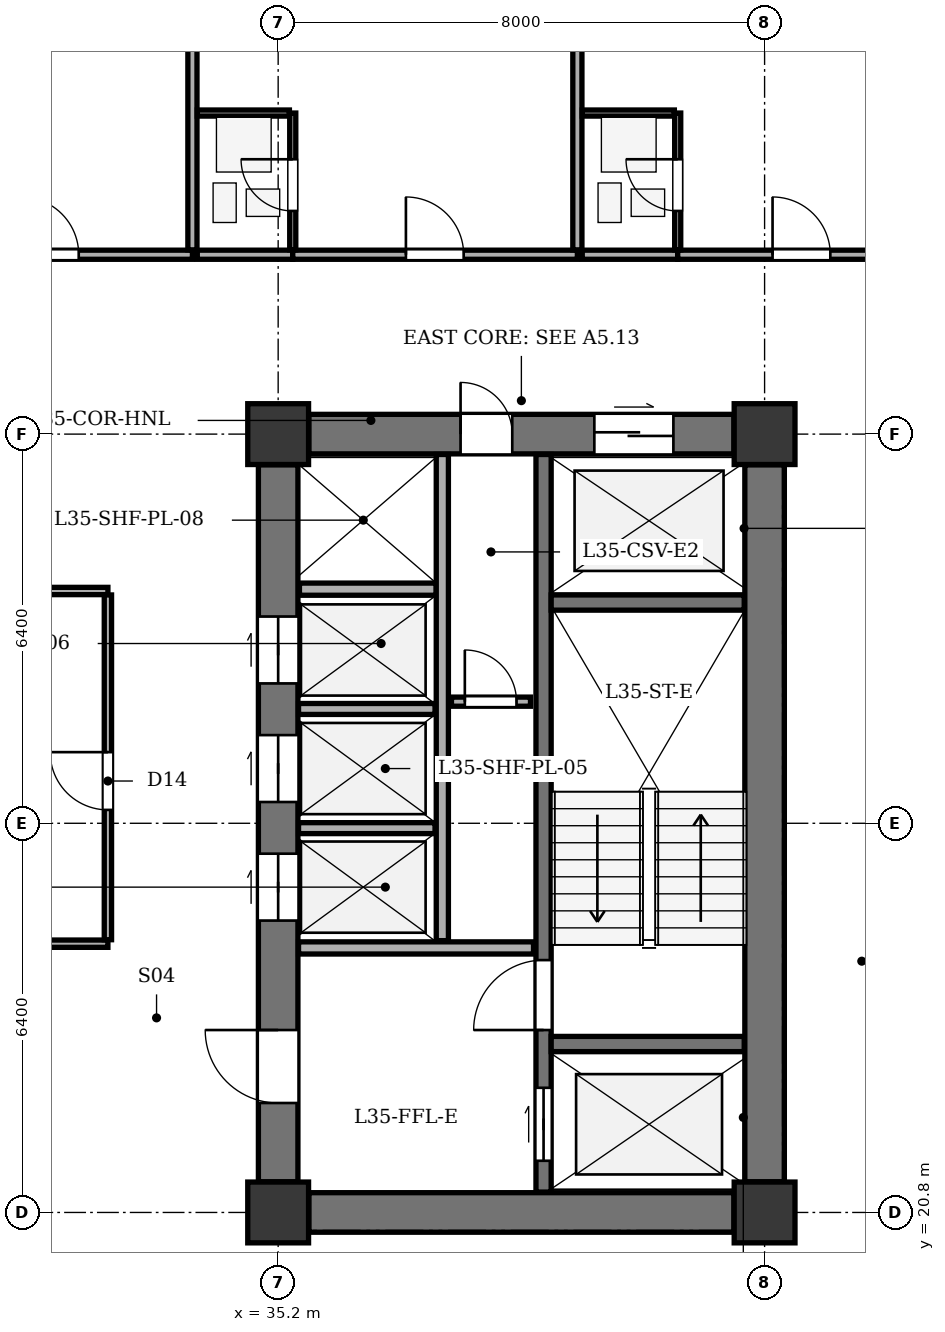
"""IFC4 building model, lengths in metres.
Left out: names, types, materials, properties, quantities, classifications, styles, units other than length and angle.
Written with IfcOpenShell. Run it as: python <this file> out.ifc"""

import sys

from ifc_helpers import new_model, si_unit, direction, frame, frame_2d, origin, origin_2d, place, context, subcontext, project, spatial, rectangle, extrude, element, fill, save


model = new_model("IFC4")
c1 = context("Model", 3, precision=1e-05, world=origin(), true_north=direction((0.0, 1.0)))
c2 = subcontext(c1, "Body", "Model", "MODEL_VIEW")
j1 = project(units=[si_unit("LENGTHUNIT", "METRE"), si_unit("PLANEANGLEUNIT", "RADIAN")], contexts=[c1])
p1 = place(None, origin())
s1 = spatial("IfcSite", under=j1, at=p1, CompositionType="ELEMENT")
p2 = place(p1, origin())
s2 = spatial("IfcBuilding", under=s1, at=p2, CompositionType="ELEMENT")
p3 = place(p2, frame((0.0, 0.0, 141.3)))
s3 = spatial("IfcBuildingStorey", under=s2, at=p3, CompositionType="ELEMENT", Elevation=141.3)
for number, where, z_axis, x_axis in (
    (1, (35.2, 20.8, 0.0), (0.0, 0.0, 1.0), (1.0, 0.0, 0.0)),
    (2, (43.2, 20.8, 0.0), (0.0, 0.0, 1.0), (1.0, 0.0, 0.0)),
    (3, (35.2, 33.6, 0.0), (0.0, 0.0, 1.0), (1.0, 0.0, 0.0)),
    (4, (43.2, 33.6, 0.0), (0.0, 0.0, 1.0), (1.0, 0.0, 0.0)),
):
    element("IfcColumn", number, at=place(p3, frame(where, z_axis=z_axis, x_axis=x_axis)), inside=s3, PredefinedType="COLUMN", context=c2, shape_type="SweptSolid", body=[
        extrude(rectangle(XDim=1.0, YDim=1.0, at=origin_2d()), origin(), (0.0, 0.0, 1.0), 3.5),
    ])
p4 = place(p3, frame((43.2, 21.305, 0.0), z_axis=(0.0, 0.0, 1.0), x_axis=(0.0, 1.0, 0.0)))
e5 = element("IfcWall", 5, at=p4, inside=s3, PredefinedType="SHEAR", context=c2, shape_type="SweptSolid", body=[
    extrude(rectangle(XDim=11.79, YDim=0.65, at=frame_2d((5.895, 0.0))), origin(), (0.0, 0.0, 1.0), 3.2),
])
p5 = place(p3, frame((35.705, 20.8, 0.0), z_axis=(0.0, 0.0, 1.0), x_axis=(1.0, 0.0, 0.0)))
e6 = element("IfcWall", 6, at=p5, inside=s3, PredefinedType="SHEAR", context=c2, shape_type="SweptSolid", body=[
    extrude(rectangle(XDim=6.99, YDim=0.65, at=frame_2d((3.495, 0.0))), origin(), (0.0, 0.0, 1.0), 3.2),
])
p6 = place(p3, frame((35.705, 33.6, 0.0), z_axis=(0.0, 0.0, 1.0), x_axis=(1.0, 0.0, 0.0)))
e7 = element("IfcWall", 7, at=p6, inside=s3, PredefinedType="SHEAR", context=c2, shape_type="SweptSolid", body=[
    extrude(rectangle(XDim=6.99, YDim=0.65, at=frame_2d((3.495, 0.0))), origin(), (0.0, 0.0, 1.0), 3.2),
])
p7 = place(p6, frame((4.695, 0.0, 0.0)))
e8 = element("IfcOpeningElement", 8, at=p7, cuts=e7, PredefinedType="OPENING", context=c2, shape_type="SweptSolid", body=[
    extrude(rectangle(XDim=1.3, YDim=2.15, at=frame_2d((0.65, 1.075))), frame((0.0, 0.335, 0.0), z_axis=(0.0, -1.0, 0.0), x_axis=(1.0, 0.0, 0.0)), (0.0, 0.0, 1.0), 0.67),
])
p8 = place(p6, frame((2.495, 0.0, 0.0)))
e9 = element("IfcOpeningElement", 9, at=p8, cuts=e7, PredefinedType="OPENING", context=c2, shape_type="SweptSolid", body=[
    extrude(rectangle(XDim=0.85, YDim=2.02, at=frame_2d((0.425, 1.01))), frame((0.0, 0.335, 0.0), z_axis=(0.0, -1.0, 0.0), x_axis=(1.0, 0.0, 0.0)), (0.0, 0.0, 1.0), 0.67),
])
p9 = place(p3, frame((35.2, 21.305, 0.0), z_axis=(0.0, 0.0, 1.0), x_axis=(0.0, 1.0, 0.0)))
e10 = element("IfcWall", 10, at=p9, inside=s3, PredefinedType="SHEAR", context=c2, shape_type="SweptSolid", body=[
    extrude(rectangle(XDim=11.79, YDim=0.65, at=frame_2d((5.895, 0.0))), origin(), (0.0, 0.0, 1.0), 3.2),
])
p10 = place(p9, frame((1.295, 0.0, 0.0)))
e11 = element("IfcOpeningElement", 11, at=p10, cuts=e10, PredefinedType="OPENING", context=c2, shape_type="SweptSolid", body=[
    extrude(rectangle(XDim=1.2, YDim=2.15, at=frame_2d((0.6, 1.075))), frame((0.0, 0.335, 0.0), z_axis=(0.0, -1.0, 0.0), x_axis=(1.0, 0.0, 0.0)), (0.0, 0.0, 1.0), 0.67),
])
p11 = place(p9, frame((4.295, 0.0, 0.0)))
e12 = element("IfcOpeningElement", 12, at=p11, cuts=e10, PredefinedType="OPENING", context=c2, shape_type="SweptSolid", body=[
    extrude(rectangle(XDim=1.1, YDim=2.1, at=frame_2d((0.55, 1.05))), frame((0.0, 0.335, 0.0), z_axis=(0.0, -1.0, 0.0), x_axis=(1.0, 0.0, 0.0)), (0.0, 0.0, 1.0), 0.67),
])
p12 = place(p9, frame((6.245, 0.0, 0.0)))
e13 = element("IfcOpeningElement", 13, at=p12, cuts=e10, PredefinedType="OPENING", context=c2, shape_type="SweptSolid", body=[
    extrude(rectangle(XDim=1.1, YDim=2.1, at=frame_2d((0.55, 1.05))), frame((0.0, 0.335, 0.0), z_axis=(0.0, -1.0, 0.0), x_axis=(1.0, 0.0, 0.0)), (0.0, 0.0, 1.0), 0.67),
])
p13 = place(p9, frame((8.195, 0.0, 0.0)))
e14 = element("IfcOpeningElement", 14, at=p13, cuts=e10, PredefinedType="OPENING", context=c2, shape_type="SweptSolid", body=[
    extrude(rectangle(XDim=1.1, YDim=2.1, at=frame_2d((0.55, 1.05))), frame((0.0, 0.335, 0.0), z_axis=(0.0, -1.0, 0.0), x_axis=(1.0, 0.0, 0.0)), (0.0, 0.0, 1.0), 0.67),
])
p14 = place(p3, frame((39.565, 21.135, 0.0), z_axis=(0.0, 0.0, 1.0), x_axis=(0.0, 1.0, 0.0)))
e15 = element("IfcWall", 15, at=p14, inside=s3, PredefinedType="SHEAR", context=c2, shape_type="SweptSolid", body=[
    extrude(rectangle(XDim=12.13, YDim=0.25, at=frame_2d((6.065, 0.0))), origin(), (0.0, 0.0, 1.0), 3.2),
])
p15 = place(p14, frame((0.515, 0.0, 0.0)))
e16 = element("IfcOpeningElement", 16, at=p15, cuts=e15, PredefinedType="OPENING", context=c2, shape_type="SweptSolid", body=[
    extrude(rectangle(XDim=1.2, YDim=2.15, at=frame_2d((0.6, 1.075))), frame((0.0, 0.135, 0.0), z_axis=(0.0, -1.0, 0.0), x_axis=(1.0, 0.0, 0.0)), (0.0, 0.0, 1.0), 0.27),
])
p16 = place(p14, frame((2.665, 0.0, 0.0)))
e17 = element("IfcOpeningElement", 17, at=p16, cuts=e15, PredefinedType="OPENING", context=c2, shape_type="SweptSolid", body=[
    extrude(rectangle(XDim=1.15, YDim=2.15, at=frame_2d((0.575, 1.075))), frame((0.0, 0.135, 0.0), z_axis=(0.0, -1.0, 0.0), x_axis=(1.0, 0.0, 0.0)), (0.0, 0.0, 1.0), 0.27),
])
for number, where, z_axis, x_axis in (
    (18, (39.69, 23.57, 0.0), (0.0, 0.0, 1.0), (1.0, 0.0, 0.0)),
    (19, (39.69, 30.83, 0.0), (0.0, 0.0, 1.0), (1.0, 0.0, 0.0)),
):
    element("IfcWall", number, at=place(p3, frame(where, z_axis=z_axis, x_axis=x_axis)), inside=s3, PredefinedType="SHEAR", context=c2, shape_type="SweptSolid", body=[
        extrude(rectangle(XDim=3.175, YDim=0.25, at=frame_2d((1.587, 0.0))), origin(), (0.0, 0.0, 1.0), 3.2),
    ])
p17 = place(p3, frame((35.535, 25.15, 0.0), z_axis=(0.0, 0.0, 1.0), x_axis=(1.0, 0.0, 0.0)))
e20 = element("IfcWall", 20, at=p17, inside=s3, PredefinedType="SOLIDWALL", context=c2, shape_type="SweptSolid", body=[
    extrude(rectangle(XDim=3.865, YDim=0.2, at=frame_2d((1.933, 0.0))), origin(), (0.0, 0.0, 1.0), 3.2),
])
p18 = place(p3, frame((35.55, 31.05, 0.0), z_axis=(0.0, 0.0, 1.0), x_axis=(1.0, 0.0, 0.0)))
e21 = element("IfcWall", 21, at=p18, inside=s3, PredefinedType="SOLIDWALL", context=c2, shape_type="SweptSolid", body=[
    extrude(rectangle(XDim=2.25, YDim=0.2, at=frame_2d((1.125, 0.0))), origin(), (0.0, 0.0, 1.0), 3.2),
])
p19 = place(p3, frame((37.9, 25.27, 0.0), z_axis=(0.0, 0.0, 1.0), x_axis=(0.0, 1.0, 0.0)))
e22 = element("IfcWall", 22, at=p19, inside=s3, PredefinedType="SOLIDWALL", context=c2, shape_type="SweptSolid", body=[
    extrude(rectangle(XDim=7.995, YDim=0.2, at=frame_2d((3.998, 0.0))), origin(), (0.0, 0.0, 1.0), 3.2),
])
for number, where, z_axis, x_axis in (
    (23, (35.535, 27.12, 0.0), (0.0, 0.0, 1.0), (1.0, 0.0, 0.0)),
    (24, (35.535, 29.08, 0.0), (0.0, 0.0, 1.0), (1.0, 0.0, 0.0)),
):
    element("IfcWall", number, at=place(p3, frame(where, z_axis=z_axis, x_axis=x_axis)), inside=s3, PredefinedType="PARTITIONING", context=c2, shape_type="SweptSolid", body=[
        extrude(rectangle(XDim=2.245, YDim=0.18, at=frame_2d((1.123, 0.0))), origin(), (0.0, 0.0, 1.0), 3.2),
    ])
p20 = place(p3, frame((38.05, 29.2, 0.0), z_axis=(0.0, 0.0, 1.0), x_axis=(1.0, 0.0, 0.0)))
e25 = element("IfcWall", 25, at=p20, inside=s3, PredefinedType="PARTITIONING", context=c2, shape_type="SweptSolid", body=[
    extrude(rectangle(XDim=1.3, YDim=0.15, at=frame_2d((0.65, 0.0))), origin(), (0.0, 0.0, 1.0), 3.2),
])
p21 = place(p20, frame((0.22, 0.0, 0.0)))
e26 = element("IfcOpeningElement", 26, at=p21, cuts=e25, PredefinedType="OPENING", context=c2, shape_type="SweptSolid", body=[
    extrude(rectangle(XDim=0.85, YDim=2.02, at=frame_2d((0.425, 1.01))), frame((0.0, 0.085, 0.0), z_axis=(0.0, -1.0, 0.0), x_axis=(1.0, 0.0, 0.0)), (0.0, 0.0, 1.0), 0.17),
])
p22 = place(p3, frame((20.46, 25.22, 0.0), z_axis=(0.0, 0.0, 1.0), x_axis=(1.0, 0.0, 0.0)))
e27 = element("IfcWall", 27, at=p22, inside=s3, PredefinedType="PARTITIONING", context=c2, shape_type="SweptSolid", body=[
    extrude(rectangle(XDim=11.94, YDim=0.12, at=frame_2d((5.97, 0.0))), origin(), (0.0, 0.0, 1.0), 3.2),
])
p23 = place(p22, frame((2.39, 0.0, 0.0)))
e28 = element("IfcOpeningElement", 28, at=p23, cuts=e27, PredefinedType="OPENING", context=c2, shape_type="SweptSolid", body=[
    extrude(rectangle(XDim=1.0, YDim=2.1, at=frame_2d((0.5, 1.05))), frame((0.0, 0.07, 0.0), z_axis=(0.0, -1.0, 0.0), x_axis=(1.0, 0.0, 0.0)), (0.0, 0.0, 1.0), 0.14),
])
p24 = place(p3, frame((20.46, 31.02, 0.0), z_axis=(0.0, 0.0, 1.0), x_axis=(1.0, 0.0, 0.0)))
e29 = element("IfcWall", 29, at=p24, inside=s3, PredefinedType="PARTITIONING", context=c2, shape_type="SweptSolid", body=[
    extrude(rectangle(XDim=11.94, YDim=0.12, at=frame_2d((5.97, 0.0))), origin(), (0.0, 0.0, 1.0), 3.2),
])
p25 = place(p3, frame((32.4, 25.285, 0.0), z_axis=(0.0, 0.0, 1.0), x_axis=(0.0, 1.0, 0.0)))
e30 = element("IfcWall", 30, at=p25, inside=s3, PredefinedType="PARTITIONING", context=c2, shape_type="SweptSolid", body=[
    extrude(rectangle(XDim=5.67, YDim=0.12, at=frame_2d((2.835, 0.0))), origin(), (0.0, 0.0, 1.0), 3.2),
])
p26 = place(p25, frame((2.135, 0.0, 0.0)))
e31 = element("IfcOpeningElement", 31, at=p26, cuts=e30, PredefinedType="OPENING", context=c2, shape_type="SweptSolid", body=[
    extrude(rectangle(XDim=0.95, YDim=2.1, at=frame_2d((0.475, 1.05))), frame((0.0, 0.07, 0.0), z_axis=(0.0, -1.0, 0.0), x_axis=(1.0, 0.0, 0.0)), (0.0, 0.0, 1.0), 0.14),
])
p27 = place(p3, frame((29.109, 36.55, 0.0), z_axis=(0.0, 0.0, 1.0), x_axis=(1.0, 0.0, 0.0)))
e32 = element("IfcWall", 32, at=p27, inside=s3, PredefinedType="PARTITIONING", context=c2, shape_type="SweptSolid", body=[
    extrude(rectangle(XDim=4.681, YDim=0.15, at=frame_2d((2.341, 0.0))), origin(), (0.0, 0.0, 1.0), 3.2),
])
p28 = place(p27, frame((1.861, 0.0, 0.0)))
e33 = element("IfcOpeningElement", 33, at=p28, cuts=e32, PredefinedType="OPENING", context=c2, shape_type="SweptSolid", body=[
    extrude(rectangle(XDim=0.95, YDim=2.1, at=frame_2d((0.475, 1.05))), frame((0.0, 0.085, 0.0), z_axis=(0.0, -1.0, 0.0), x_axis=(1.0, 0.0, 0.0)), (0.0, 0.0, 1.0), 0.17),
])
p29 = place(p3, frame((33.79, 36.63, 0.0), z_axis=(0.0, 0.0, 1.0), x_axis=(0.0, 1.0, 0.0)))
e34 = element("IfcWall", 34, at=p29, inside=s3, PredefinedType="PARTITIONING", context=c2, shape_type="SweptSolid", body=[
    extrude(rectangle(XDim=9.495, YDim=0.15, at=frame_2d((4.748, 0.0))), origin(), (0.0, 0.0, 1.0), 2.785),
])
p30 = place(p3, frame((33.87, 36.55, 0.0), z_axis=(0.0, 0.0, 1.0), x_axis=(1.0, 0.0, 0.0)))
e35 = element("IfcWall", 35, at=p30, inside=s3, PredefinedType="PARTITIONING", context=c2, shape_type="SweptSolid", body=[
    extrude(rectangle(XDim=1.57, YDim=0.15, at=frame_2d((0.785, 0.0))), origin(), (0.0, 0.0, 1.0), 3.2),
])
p31 = place(p3, frame((35.44, 36.55, 0.0), z_axis=(0.0, 0.0, 1.0), x_axis=(1.0, 0.0, 0.0)))
e36 = element("IfcWall", 36, at=p31, inside=s3, PredefinedType="PARTITIONING", context=c2, shape_type="SweptSolid", body=[
    extrude(rectangle(XDim=4.681, YDim=0.15, at=frame_2d((2.341, 0.0))), origin(), (0.0, 0.0, 1.0), 3.2),
])
p32 = place(p31, frame((1.861, 0.0, 0.0)))
e37 = element("IfcOpeningElement", 37, at=p32, cuts=e36, PredefinedType="OPENING", context=c2, shape_type="SweptSolid", body=[
    extrude(rectangle(XDim=0.95, YDim=2.1, at=frame_2d((0.475, 1.05))), frame((0.0, 0.085, 0.0), z_axis=(0.0, -1.0, 0.0), x_axis=(1.0, 0.0, 0.0)), (0.0, 0.0, 1.0), 0.17),
])
p33 = place(p3, frame((35.44, 36.63, 0.0), z_axis=(0.0, 0.0, 1.0), x_axis=(0.0, 1.0, 0.0)))
e38 = element("IfcWall", 38, at=p33, inside=s3, PredefinedType="PARTITIONING", context=c2, shape_type="SweptSolid", body=[
    extrude(rectangle(XDim=2.25, YDim=0.1, at=frame_2d((1.125, 0.0))), origin(), (0.0, 0.0, 1.0), 2.535),
])
p34 = place(p33, frame((0.64, 0.0, 0.0)))
e39 = element("IfcOpeningElement", 39, at=p34, cuts=e38, PredefinedType="OPENING", context=c2, shape_type="SweptSolid", body=[
    extrude(rectangle(XDim=0.85, YDim=2.05, at=frame_2d((0.425, 1.025))), frame((0.0, 0.06, 0.0), z_axis=(0.0, -1.0, 0.0), x_axis=(1.0, 0.0, 0.0)), (0.0, 0.0, 1.0), 0.12),
])
p35 = place(p3, frame((33.87, 38.88, 0.0), z_axis=(0.0, 0.0, 1.0), x_axis=(1.0, 0.0, 0.0)))
e40 = element("IfcWall", 40, at=p35, inside=s3, PredefinedType="PARTITIONING", context=c2, shape_type="SweptSolid", body=[
    extrude(rectangle(XDim=1.515, YDim=0.1, at=frame_2d((0.757, 0.0))), origin(), (0.0, 0.0, 1.0), 3.2),
])
p36 = place(p3, frame((40.121, 36.63, 0.0), z_axis=(0.0, 0.0, 1.0), x_axis=(0.0, 1.0, 0.0)))
e41 = element("IfcWall", 41, at=p36, inside=s3, PredefinedType="PARTITIONING", context=c2, shape_type="SweptSolid", body=[
    extrude(rectangle(XDim=9.495, YDim=0.15, at=frame_2d((4.748, 0.0))), origin(), (0.0, 0.0, 1.0), 3.2),
])
p37 = place(p3, frame((40.201, 36.55, 0.0), z_axis=(0.0, 0.0, 1.0), x_axis=(1.0, 0.0, 0.0)))
e42 = element("IfcWall", 42, at=p37, inside=s3, PredefinedType="PARTITIONING", context=c2, shape_type="SweptSolid", body=[
    extrude(rectangle(XDim=1.57, YDim=0.15, at=frame_2d((0.785, 0.0))), origin(), (0.0, 0.0, 1.0), 3.2),
])
p38 = place(p3, frame((41.771, 36.55, 0.0), z_axis=(0.0, 0.0, 1.0), x_axis=(1.0, 0.0, 0.0)))
e43 = element("IfcWall", 43, at=p38, inside=s3, PredefinedType="PARTITIONING", context=c2, shape_type="SweptSolid", body=[
    extrude(rectangle(XDim=4.079, YDim=0.15, at=frame_2d((2.04, 0.0))), origin(), (0.0, 0.0, 1.0), 3.2),
])
p39 = place(p38, frame((1.56, 0.0, 0.0)))
e44 = element("IfcOpeningElement", 44, at=p39, cuts=e43, PredefinedType="OPENING", context=c2, shape_type="SweptSolid", body=[
    extrude(rectangle(XDim=0.95, YDim=2.1, at=frame_2d((0.475, 1.05))), frame((0.0, 0.085, 0.0), z_axis=(0.0, -1.0, 0.0), x_axis=(1.0, 0.0, 0.0)), (0.0, 0.0, 1.0), 0.17),
])
p40 = place(p3, frame((41.771, 36.63, 0.0), z_axis=(0.0, 0.0, 1.0), x_axis=(0.0, 1.0, 0.0)))
e45 = element("IfcWall", 45, at=p40, inside=s3, PredefinedType="PARTITIONING", context=c2, shape_type="SweptSolid", body=[
    extrude(rectangle(XDim=2.25, YDim=0.1, at=frame_2d((1.125, 0.0))), origin(), (0.0, 0.0, 1.0), 3.2),
])
p41 = place(p40, frame((0.64, 0.0, 0.0)))
e46 = element("IfcOpeningElement", 46, at=p41, cuts=e45, PredefinedType="OPENING", context=c2, shape_type="SweptSolid", body=[
    extrude(rectangle(XDim=0.85, YDim=2.05, at=frame_2d((0.425, 1.025))), frame((0.0, 0.06, 0.0), z_axis=(0.0, -1.0, 0.0), x_axis=(1.0, 0.0, 0.0)), (0.0, 0.0, 1.0), 0.12),
])
p42 = place(p3, frame((40.201, 38.88, 0.0), z_axis=(0.0, 0.0, 1.0), x_axis=(1.0, 0.0, 0.0)))
e47 = element("IfcWall", 47, at=p42, inside=s3, PredefinedType="PARTITIONING", context=c2, shape_type="SweptSolid", body=[
    extrude(rectangle(XDim=1.515, YDim=0.1, at=frame_2d((0.758, 0.0))), origin(), (0.0, 0.0, 1.0), 3.2),
])
p43 = place(p7, origin())
e48 = element("IfcDoor", 48, at=p43, inside=s3, OperationType="DOUBLE_DOOR_SLIDING", PredefinedType="DOOR", context=c2, shape_type="SweptSolid", body=[
    extrude(rectangle(XDim=1.3, YDim=2.15, at=frame_2d((0.65, 1.075))), frame((0.0, 0.025, 0.0), z_axis=(0.0, -1.0, 0.0), x_axis=(1.0, 0.0, 0.0)), (0.0, 0.0, 1.0), 0.05),
])
fill(e8, e48)
p44 = place(p8, origin())
e49 = element("IfcDoor", 49, at=p44, inside=s3, OperationType="SINGLE_SWING_LEFT", PredefinedType="DOOR", context=c2, shape_type="SweptSolid", body=[
    extrude(rectangle(XDim=0.85, YDim=2.02, at=frame_2d((0.425, 1.01))), frame((0.0, 0.025, 0.0), z_axis=(0.0, -1.0, 0.0), x_axis=(1.0, 0.0, 0.0)), (0.0, 0.0, 1.0), 0.05),
])
fill(e9, e49)
p45 = place(p10, origin())
e50 = element("IfcDoor", 50, at=p45, inside=s3, OperationType="SINGLE_SWING_RIGHT", PredefinedType="DOOR", context=c2, shape_type="SweptSolid", body=[
    extrude(rectangle(XDim=1.2, YDim=2.15, at=frame_2d((0.6, 1.075))), frame((0.0, 0.025, 0.0), z_axis=(0.0, -1.0, 0.0), x_axis=(1.0, 0.0, 0.0)), (0.0, 0.0, 1.0), 0.05),
])
fill(e11, e50)
p46 = place(p11, origin())
e51 = element("IfcDoor", 51, at=p46, inside=s3, OperationType="DOUBLE_DOOR_SLIDING", PredefinedType="DOOR", context=c2, shape_type="SweptSolid", body=[
    extrude(rectangle(XDim=1.1, YDim=2.1, at=frame_2d((0.55, 1.05))), frame((0.0, 0.025, 0.0), z_axis=(0.0, -1.0, 0.0), x_axis=(1.0, 0.0, 0.0)), (0.0, 0.0, 1.0), 0.05),
])
fill(e12, e51)
p47 = place(p12, origin())
e52 = element("IfcDoor", 52, at=p47, inside=s3, OperationType="DOUBLE_DOOR_SLIDING", PredefinedType="DOOR", context=c2, shape_type="SweptSolid", body=[
    extrude(rectangle(XDim=1.1, YDim=2.1, at=frame_2d((0.55, 1.05))), frame((0.0, 0.025, 0.0), z_axis=(0.0, -1.0, 0.0), x_axis=(1.0, 0.0, 0.0)), (0.0, 0.0, 1.0), 0.05),
])
fill(e13, e52)
p48 = place(p13, origin())
e53 = element("IfcDoor", 53, at=p48, inside=s3, OperationType="DOUBLE_DOOR_SLIDING", PredefinedType="DOOR", context=c2, shape_type="SweptSolid", body=[
    extrude(rectangle(XDim=1.1, YDim=2.1, at=frame_2d((0.55, 1.05))), frame((0.0, 0.025, 0.0), z_axis=(0.0, -1.0, 0.0), x_axis=(1.0, 0.0, 0.0)), (0.0, 0.0, 1.0), 0.05),
])
fill(e14, e53)
p49 = place(p15, origin())
e54 = element("IfcDoor", 54, at=p49, inside=s3, OperationType="DOUBLE_DOOR_SLIDING", PredefinedType="DOOR", context=c2, shape_type="SweptSolid", body=[
    extrude(rectangle(XDim=1.2, YDim=2.15, at=frame_2d((0.6, 1.075))), frame((0.0, 0.025, 0.0), z_axis=(0.0, -1.0, 0.0), x_axis=(1.0, 0.0, 0.0)), (0.0, 0.0, 1.0), 0.05),
])
fill(e16, e54)
p50 = place(p16, origin())
e55 = element("IfcDoor", 55, at=p50, inside=s3, OperationType="SINGLE_SWING_LEFT", PredefinedType="DOOR", context=c2, shape_type="SweptSolid", body=[
    extrude(rectangle(XDim=1.15, YDim=2.15, at=frame_2d((0.575, 1.075))), frame((0.0, 0.025, 0.0), z_axis=(0.0, -1.0, 0.0), x_axis=(1.0, 0.0, 0.0)), (0.0, 0.0, 1.0), 0.05),
])
fill(e17, e55)
p51 = place(p21, origin())
e56 = element("IfcDoor", 56, at=p51, inside=s3, OperationType="SINGLE_SWING_LEFT", PredefinedType="DOOR", context=c2, shape_type="SweptSolid", body=[
    extrude(rectangle(XDim=0.85, YDim=2.02, at=frame_2d((0.425, 1.01))), frame((0.0, 0.025, 0.0), z_axis=(0.0, -1.0, 0.0), x_axis=(1.0, 0.0, 0.0)), (0.0, 0.0, 1.0), 0.05),
])
fill(e26, e56)
p52 = place(p26, origin())
e57 = element("IfcDoor", 57, at=p52, inside=s3, OperationType="SINGLE_SWING_RIGHT", PredefinedType="DOOR", context=c2, shape_type="SweptSolid", body=[
    extrude(rectangle(XDim=0.95, YDim=2.1, at=frame_2d((0.475, 1.05))), frame((0.0, 0.025, 0.0), z_axis=(0.0, -1.0, 0.0), x_axis=(1.0, 0.0, 0.0)), (0.0, 0.0, 1.0), 0.05),
])
fill(e31, e57)
p53 = place(p28, origin())
e58 = element("IfcDoor", 58, at=p53, inside=s3, OperationType="SINGLE_SWING_LEFT", PredefinedType="DOOR", context=c2, shape_type="SweptSolid", body=[
    extrude(rectangle(XDim=0.95, YDim=2.1, at=frame_2d((0.475, 1.05))), frame((0.0, 0.025, 0.0), z_axis=(0.0, -1.0, 0.0), x_axis=(1.0, 0.0, 0.0)), (0.0, 0.0, 1.0), 0.05),
])
fill(e33, e58)
p54 = place(p34, origin())
e59 = element("IfcDoor", 59, at=p54, inside=s3, OperationType="SINGLE_SWING_RIGHT", PredefinedType="DOOR", context=c2, shape_type="SweptSolid", body=[
    extrude(rectangle(XDim=0.85, YDim=2.05, at=frame_2d((0.425, 1.025))), frame((0.0, 0.025, 0.0), z_axis=(0.0, -1.0, 0.0), x_axis=(1.0, 0.0, 0.0)), (0.0, 0.0, 1.0), 0.05),
])
fill(e39, e59)
p55 = place(p32, origin())
e60 = element("IfcDoor", 60, at=p55, inside=s3, OperationType="SINGLE_SWING_LEFT", PredefinedType="DOOR", context=c2, shape_type="SweptSolid", body=[
    extrude(rectangle(XDim=0.95, YDim=2.1, at=frame_2d((0.475, 1.05))), frame((0.0, 0.025, 0.0), z_axis=(0.0, -1.0, 0.0), x_axis=(1.0, 0.0, 0.0)), (0.0, 0.0, 1.0), 0.05),
])
fill(e37, e60)
p56 = place(p41, origin())
e61 = element("IfcDoor", 61, at=p56, inside=s3, OperationType="SINGLE_SWING_RIGHT", PredefinedType="DOOR", context=c2, shape_type="SweptSolid", body=[
    extrude(rectangle(XDim=0.85, YDim=2.05, at=frame_2d((0.425, 1.025))), frame((0.0, 0.025, 0.0), z_axis=(0.0, -1.0, 0.0), x_axis=(1.0, 0.0, 0.0)), (0.0, 0.0, 1.0), 0.05),
])
fill(e46, e61)
p57 = place(p39, origin())
e62 = element("IfcDoor", 62, at=p57, inside=s3, OperationType="SINGLE_SWING_LEFT", PredefinedType="DOOR", context=c2, shape_type="SweptSolid", body=[
    extrude(rectangle(XDim=0.95, YDim=2.1, at=frame_2d((0.475, 1.05))), frame((0.0, 0.025, 0.0), z_axis=(0.0, -1.0, 0.0), x_axis=(1.0, 0.0, 0.0)), (0.0, 0.0, 1.0), 0.05),
])
fill(e44, e62)
save(model, sys.argv[1])
